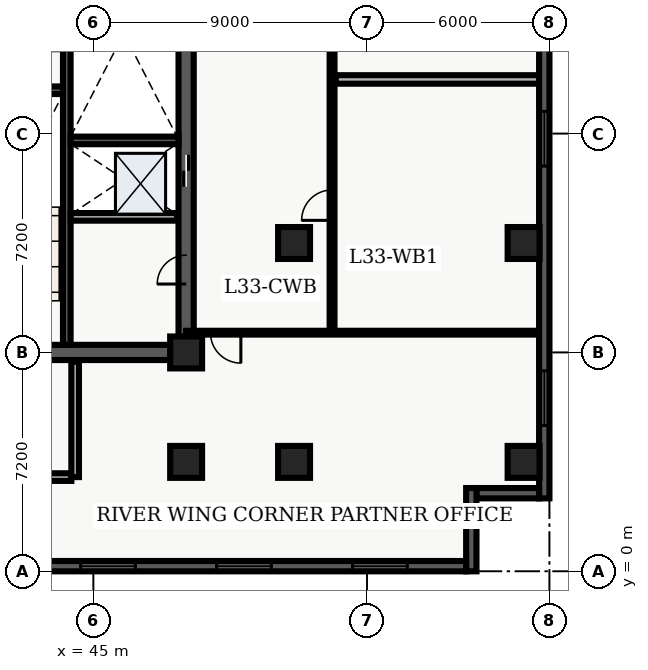
"""IFC4 building model, lengths in metres.
Left out: names, types, materials, properties, quantities, classifications, styles, units other than length and angle.
Written with IfcOpenShell. Run it as: python <this file> out.ifc"""

import sys

from ifc_helpers import new_model, entity, si_unit, converted_unit, direction, frame, origin_with_axes, origin_2d_with_axis, place, context, subcontext, project, spatial, polyline, rectangle, outline, extrude, element, fill, save


model = new_model("IFC4")
c1 = context("Model", 3, precision=1e-05, world=origin_with_axes(), true_north=direction((0.0, 1.0)))
c2 = subcontext(c1, "Body", "Model", "MODEL_VIEW")
j1 = project(units=[si_unit("LENGTHUNIT", "METRE"), converted_unit("PLANEANGLEUNIT", "DEGREE", entity("IfcPlaneAngleMeasure", 0.017), si_unit("PLANEANGLEUNIT", "RADIAN"), dimensions=[0, 0, 0, 0, 0, 0, 0])], contexts=[c1])
p1 = place(None, origin_with_axes())
s1 = spatial("IfcSite", under=j1, at=p1, CompositionType="ELEMENT")
p2 = place(p1, origin_with_axes())
s2 = spatial("IfcBuilding", under=s1, at=p2, CompositionType="ELEMENT")
p3 = place(p2, frame((0.0, 0.0, 136.8), z_axis=(0.0, 0.0, 1.0), x_axis=(1.0, 0.0, 0.0)))
s3 = spatial("IfcBuildingStorey", under=s2, at=p3, CompositionType="ELEMENT", Elevation=136.8)
p4 = place(p3, frame((40.2, 7.2, 0.0), z_axis=(0.0, 0.0, 1.0), x_axis=(1.0, 0.0, 0.0)))
e1 = element("IfcWall", 1, at=p4, inside=s3, PredefinedType="SHEAR", context=c2, shape_type="SweptSolid", body=[
    extrude(outline(polyline([(0.0, -0.25), (7.85, -0.25), (7.85, 0.25), (0.0, 0.25), (0.0, -0.25)])), origin_with_axes(), (0.0, 0.0, 1.0), 3.66),
])
p5 = place(p4, frame((2.175, 0.0, 0.0), z_axis=(0.0, 0.0, 1.0), x_axis=(1.0, 0.0, 0.0)))
e2 = element("IfcOpeningElement", 2, at=p5, cuts=e1, PredefinedType="OPENING", context=c2, shape_type="SweptSolid", body=[
    extrude(rectangle(XDim=1.05, YDim=0.52, at=origin_2d_with_axis()), origin_with_axes(), (0.0, 0.0, 1.0), 2.15),
])
p6 = place(p3, frame((48.05, 7.2, 0.0), z_axis=(0.0, 0.0, 1.0), x_axis=(0.0, 1.0, 0.0)))
e3 = element("IfcWall", 3, at=p6, inside=s3, PredefinedType="SHEAR", context=c2, shape_type="SweptSolid", body=[
    extrude(outline(polyline([(0.0, -0.25), (15.6, -0.25), (15.6, 0.25), (0.0, 0.25), (0.0, -0.25)])), origin_with_axes(), (0.0, 0.0, 1.0), 3.66),
])
p7 = place(p6, frame((5.975, 0.0, 0.0), z_axis=(0.0, 0.0, 1.0), x_axis=(1.0, 0.0, 0.0)))
e4 = element("IfcOpeningElement", 4, at=p7, cuts=e3, PredefinedType="OPENING", context=c2, shape_type="SweptSolid", body=[
    extrude(rectangle(XDim=1.05, YDim=0.52, at=origin_2d_with_axis()), origin_with_axes(), (0.0, 0.0, 1.0), 2.15),
])
p8 = place(p6, frame((2.725, 0.0, 0.0), z_axis=(0.0, 0.0, 1.0), x_axis=(1.0, 0.0, 0.0)))
e5 = element("IfcOpeningElement", 5, at=p8, cuts=e3, PredefinedType="OPENING", context=c2, shape_type="SweptSolid", body=[
    extrude(rectangle(XDim=0.95, YDim=0.52, at=origin_2d_with_axis()), origin_with_axes(), (0.0, 0.0, 1.0), 2.15),
])
p9 = place(p3, frame((44.125, 7.45, 0.0), z_axis=(0.0, 0.0, 1.0), x_axis=(0.0, 1.0, 0.0)))
e6 = element("IfcWall", 6, at=p9, inside=s3, PredefinedType="SHEAR", context=c2, shape_type="SweptSolid", body=[
    extrude(outline(polyline([(0.0, -0.125), (15.1, -0.125), (15.1, 0.125), (0.0, 0.125), (0.0, -0.125)])), origin_with_axes(), (0.0, 0.0, 1.0), 3.66),
])
for number, where, z_axis, x_axis in (
    (7, (40.45, 15.825, 0.0), (0.0, 0.0, 1.0), (1.0, 0.0, 0.0)),
    (8, (44.25, 14.175, 0.0), (0.0, 0.0, 1.0), (1.0, 0.0, 0.0)),
):
    element("IfcWall", number, at=place(p3, frame(where, z_axis=z_axis, x_axis=x_axis)), inside=s3, PredefinedType="SHEAR", context=c2, shape_type="SweptSolid", body=[
        extrude(outline(polyline([(0.0, -0.125), (3.55, -0.125), (3.55, 0.125), (0.0, 0.125), (0.0, -0.125)])), origin_with_axes(), (0.0, 0.0, 1.0), 3.66),
    ])
p10 = place(p3, frame((40.325, 3.1, 0.0), z_axis=(0.0, 0.0, 1.0), x_axis=(1.0, 0.0, 0.0)))
e9 = element("IfcWall", 9, at=p10, inside=s3, PredefinedType="SOLIDWALL", context=c2, shape_type="SweptSolid", body=[
    extrude(outline(polyline([(0.0, -0.125), (3.95, -0.125), (3.95, 0.125), (0.0, 0.125), (0.0, -0.125)])), origin_with_axes(), (0.0, 0.0, 1.0), 2.7),
])
p11 = place(p3, frame((44.4, 3.1, 0.0), z_axis=(0.0, 0.0, 1.0), x_axis=(0.0, 1.0, 0.0)))
e10 = element("IfcWall", 10, at=p11, inside=s3, PredefinedType="SOLIDWALL", context=c2, shape_type="SweptSolid", body=[
    extrude(outline(polyline([(0.0, -0.125), (3.8, -0.125), (3.8, 0.125), (0.0, 0.125), (0.0, -0.125)])), origin_with_axes(), (0.0, 0.0, 1.0), 2.7),
])
for number, where, z_axis, x_axis in (
    (11, (48.05, 3.6, 0.0), (0.0, 0.0, 1.0), (1.0, 0.0, 0.0)),
    (12, (48.05, 7.2, 0.0), (0.0, 0.0, 1.0), (1.0, 0.0, 0.0)),
    (13, (51.6, 3.6, 0.0), (0.0, 0.0, 1.0), (1.0, 0.0, 0.0)),
    (14, (51.6, 10.8, 0.0), (0.0, 0.0, 1.0), (1.0, 0.0, 0.0)),
    (15, (59.15, 3.6, 0.0), (0.0, 0.0, 1.0), (1.0, 0.0, 0.0)),
    (16, (59.15, 10.8, 0.0), (0.0, 0.0, 1.0), (1.0, 0.0, 0.0)),
):
    element("IfcColumn", number, at=place(p3, frame(where, z_axis=z_axis, x_axis=x_axis)), inside=s3, PredefinedType="COLUMN", context=c2, shape_type="SweptSolid", body=[
        extrude(rectangle(XDim=1.05, YDim=1.05, at=origin_2d_with_axis()), origin_with_axes(), (0.0, 0.0, 1.0), 3.9),
    ])
p12 = place(p3, frame((44.25, 11.66, 0.0), z_axis=(0.0, 0.0, 1.0), x_axis=(1.0, 0.0, 0.0)))
e17 = element("IfcWall", 17, at=p12, inside=s3, PredefinedType="SOLIDWALL", context=c2, shape_type="SweptSolid", body=[
    extrude(outline(polyline([(0.0, -0.125), (3.5, -0.125), (3.5, 0.125), (0.0, 0.125), (0.0, -0.125)])), origin_with_axes(), (0.0, 0.0, 1.0), 2.7),
])
p13 = place(p3, frame((52.85, 7.85, 0.0), z_axis=(0.0, 0.0, 1.0), x_axis=(0.0, 1.0, 0.0)))
e18 = element("IfcWall", 18, at=p13, inside=s3, PredefinedType="PARTITIONING", context=c2, shape_type="SweptSolid", body=[
    extrude(outline(polyline([(0.0, -0.08), (18.8, -0.08), (18.8, 0.08), (0.0, 0.08), (0.0, -0.08)])), origin_with_axes(), (0.0, 0.0, 1.0), 2.7),
])
p14 = place(p13, frame((4.195, 0.0, 0.0), z_axis=(0.0, 0.0, 1.0), x_axis=(1.0, 0.0, 0.0)))
e19 = element("IfcOpeningElement", 19, at=p14, cuts=e18, PredefinedType="OPENING", context=c2, shape_type="SweptSolid", body=[
    extrude(rectangle(XDim=1.0, YDim=0.18, at=origin_2d_with_axis()), origin_with_axes(), (0.0, 0.0, 1.0), 2.15),
])
p15 = place(p13, frame((13.535, 0.0, 0.0), z_axis=(0.0, 0.0, 1.0), x_axis=(1.0, 0.0, 0.0)))
e20 = element("IfcOpeningElement", 20, at=p15, cuts=e18, PredefinedType="OPENING", context=c2, shape_type="SweptSolid", body=[
    extrude(rectangle(XDim=1.0, YDim=0.18, at=origin_2d_with_axis()), origin_with_axes(), (0.0, 0.0, 1.0), 2.15),
])
p16 = place(p3, frame((59.665, 7.85, 0.0), z_axis=(0.0, 0.0, 1.0), x_axis=(-1.0, 0.0, 0.0)))
e21 = element("IfcWall", 21, at=p16, inside=s3, PredefinedType="PARTITIONING", context=c2, shape_type="SweptSolid", body=[
    extrude(outline(polyline([(0.0, -0.062), (11.615, -0.062), (11.615, 0.062), (0.0, 0.062), (0.0, -0.062)])), origin_with_axes(), (0.0, 0.0, 1.0), 2.7),
])
p17 = place(p16, frame((10.315, 0.0, 0.0), z_axis=(0.0, 0.0, 1.0), x_axis=(1.0, 0.0, 0.0)))
e22 = element("IfcOpeningElement", 22, at=p17, cuts=e21, PredefinedType="OPENING", context=c2, shape_type="SweptSolid", body=[
    extrude(rectangle(XDim=1.0, YDim=0.145, at=origin_2d_with_axis()), origin_with_axes(), (0.0, 0.0, 1.0), 2.15),
])
p18 = place(p3, frame((52.97, 16.18, 0.0), z_axis=(0.0, 0.0, 1.0), x_axis=(1.0, 0.0, 0.0)))
e23 = element("IfcWall", 23, at=p18, inside=s3, PredefinedType="PARTITIONING", context=c2, shape_type="SweptSolid", body=[
    extrude(outline(polyline([(0.0, -0.14), (6.695, -0.14), (6.695, 0.14), (0.0, 0.14), (0.0, -0.14)])), origin_with_axes(), (0.0, 0.0, 1.0), 2.7),
])
p19 = place(p3, frame((59.83, 26.06, 0.0), z_axis=(0.0, 0.0, 1.0), x_axis=(0.0, -1.0, 0.0)))
e24 = element("IfcWall", 24, at=p19, inside=s3, PredefinedType="SOLIDWALL", context=c2, shape_type="SweptSolid", body=[
    extrude(outline(polyline([(0.0, -0.17), (23.66, -0.17), (23.66, 0.17), (0.0, 0.17), (0.0, -0.17)])), origin_with_axes(), (0.0, 0.0, 1.0), 3.66),
])
p20 = place(p19, frame((3.696, 0.0, 0.45), z_axis=(0.0, 0.0, 1.0), x_axis=(1.0, 0.0, 0.0)))
e25 = element("IfcOpeningElement", 25, at=p20, cuts=e24, PredefinedType="OPENING", context=c2, shape_type="SweptSolid", body=[
    extrude(rectangle(XDim=1.8, YDim=0.36, at=origin_2d_with_axis()), origin_with_axes(), (0.0, 0.0, 1.0), 2.1),
])
p21 = place(p19, frame((11.83, 0.0, 0.45), z_axis=(0.0, 0.0, 1.0), x_axis=(1.0, 0.0, 0.0)))
e26 = element("IfcOpeningElement", 26, at=p21, cuts=e24, PredefinedType="OPENING", context=c2, shape_type="SweptSolid", body=[
    extrude(rectangle(XDim=1.8, YDim=0.36, at=origin_2d_with_axis()), origin_with_axes(), (0.0, 0.0, 1.0), 2.1),
])
p22 = place(p19, frame((20.364, 0.0, 0.45), z_axis=(0.0, 0.0, 1.0), x_axis=(1.0, 0.0, 0.0)))
e27 = element("IfcOpeningElement", 27, at=p22, cuts=e24, PredefinedType="OPENING", context=c2, shape_type="SweptSolid", body=[
    extrude(rectangle(XDim=1.8, YDim=0.36, at=origin_2d_with_axis()), origin_with_axes(), (0.0, 0.0, 1.0), 2.1),
])
p23 = place(p3, frame((59.66, 2.57, 0.0), z_axis=(0.0, 0.0, 1.0), x_axis=(-1.0, 0.0, 0.0)))
e28 = element("IfcWall", 28, at=p23, inside=s3, PredefinedType="SOLIDWALL", context=c2, shape_type="SweptSolid", body=[
    extrude(outline(polyline([(0.0, -0.17), (2.06, -0.17), (2.06, 0.17), (0.0, 0.17), (0.0, -0.17)])), origin_with_axes(), (0.0, 0.0, 1.0), 3.66),
])
p24 = place(p3, frame((57.43, 2.74, 0.0), z_axis=(0.0, 0.0, 1.0), x_axis=(0.0, -1.0, 0.0)))
e29 = element("IfcWall", 29, at=p24, inside=s3, PredefinedType="SOLIDWALL", context=c2, shape_type="SweptSolid", body=[
    extrude(outline(polyline([(0.0, -0.17), (2.74, -0.17), (2.74, 0.17), (0.0, 0.17), (0.0, -0.17)])), origin_with_axes(), (0.0, 0.0, 1.0), 3.66),
])
p25 = place(p3, frame((57.26, 0.17, 0.0), z_axis=(0.0, 0.0, 1.0), x_axis=(-1.0, 0.0, 0.0)))
e30 = element("IfcWall", 30, at=p25, inside=s3, PredefinedType="SOLIDWALL", context=c2, shape_type="SweptSolid", body=[
    extrude(outline(polyline([(0.0, -0.17), (54.86, -0.17), (54.86, 0.17), (0.0, 0.17), (0.0, -0.17)])), origin_with_axes(), (0.0, 0.0, 1.0), 3.66),
])
p26 = place(p25, frame((2.836, 0.0, 0.45), z_axis=(0.0, 0.0, 1.0), x_axis=(1.0, 0.0, 0.0)))
e31 = element("IfcOpeningElement", 31, at=p26, cuts=e30, PredefinedType="OPENING", context=c2, shape_type="SweptSolid", body=[
    extrude(rectangle(XDim=1.8, YDim=0.36, at=origin_2d_with_axis()), origin_with_axes(), (0.0, 0.0, 1.0), 2.1),
])
p27 = place(p25, frame((7.307, 0.0, 0.45), z_axis=(0.0, 0.0, 1.0), x_axis=(1.0, 0.0, 0.0)))
e32 = element("IfcOpeningElement", 32, at=p27, cuts=e30, PredefinedType="OPENING", context=c2, shape_type="SweptSolid", body=[
    extrude(rectangle(XDim=1.8, YDim=0.36, at=origin_2d_with_axis()), origin_with_axes(), (0.0, 0.0, 1.0), 2.1),
])
p28 = place(p25, frame((11.779, 0.0, 0.45), z_axis=(0.0, 0.0, 1.0), x_axis=(1.0, 0.0, 0.0)))
e33 = element("IfcOpeningElement", 33, at=p28, cuts=e30, PredefinedType="OPENING", context=c2, shape_type="SweptSolid", body=[
    extrude(rectangle(XDim=1.8, YDim=0.36, at=origin_2d_with_axis()), origin_with_axes(), (0.0, 0.0, 1.0), 2.1),
])
p29 = place(p25, frame((16.251, 0.0, 0.45), z_axis=(0.0, 0.0, 1.0), x_axis=(1.0, 0.0, 0.0)))
e34 = element("IfcOpeningElement", 34, at=p29, cuts=e30, PredefinedType="OPENING", context=c2, shape_type="SweptSolid", body=[
    extrude(rectangle(XDim=1.8, YDim=0.36, at=origin_2d_with_axis()), origin_with_axes(), (0.0, 0.0, 1.0), 2.1),
])
p30 = place(p25, frame((20.723, 0.0, 0.45), z_axis=(0.0, 0.0, 1.0), x_axis=(1.0, 0.0, 0.0)))
e35 = element("IfcOpeningElement", 35, at=p30, cuts=e30, PredefinedType="OPENING", context=c2, shape_type="SweptSolid", body=[
    extrude(rectangle(XDim=1.8, YDim=0.36, at=origin_2d_with_axis()), origin_with_axes(), (0.0, 0.0, 1.0), 2.1),
])
p31 = place(p25, frame((34.138, 0.0, 0.45), z_axis=(0.0, 0.0, 1.0), x_axis=(1.0, 0.0, 0.0)))
e36 = element("IfcOpeningElement", 36, at=p31, cuts=e30, PredefinedType="OPENING", context=c2, shape_type="SweptSolid", body=[
    extrude(rectangle(XDim=1.8, YDim=0.36, at=origin_2d_with_axis()), origin_with_axes(), (0.0, 0.0, 1.0), 2.1),
])
p32 = place(p25, frame((38.609, 0.0, 0.45), z_axis=(0.0, 0.0, 1.0), x_axis=(1.0, 0.0, 0.0)))
e37 = element("IfcOpeningElement", 37, at=p32, cuts=e30, PredefinedType="OPENING", context=c2, shape_type="SweptSolid", body=[
    extrude(rectangle(XDim=1.8, YDim=0.36, at=origin_2d_with_axis()), origin_with_axes(), (0.0, 0.0, 1.0), 2.1),
])
p33 = place(p25, frame((43.081, 0.0, 0.45), z_axis=(0.0, 0.0, 1.0), x_axis=(1.0, 0.0, 0.0)))
e38 = element("IfcOpeningElement", 38, at=p33, cuts=e30, PredefinedType="OPENING", context=c2, shape_type="SweptSolid", body=[
    extrude(rectangle(XDim=1.8, YDim=0.36, at=origin_2d_with_axis()), origin_with_axes(), (0.0, 0.0, 1.0), 2.1),
])
p34 = place(p25, frame((47.553, 0.0, 0.45), z_axis=(0.0, 0.0, 1.0), x_axis=(1.0, 0.0, 0.0)))
e39 = element("IfcOpeningElement", 39, at=p34, cuts=e30, PredefinedType="OPENING", context=c2, shape_type="SweptSolid", body=[
    extrude(rectangle(XDim=1.8, YDim=0.36, at=origin_2d_with_axis()), origin_with_axes(), (0.0, 0.0, 1.0), 2.1),
])
p35 = place(p25, frame((52.024, 0.0, 0.45), z_axis=(0.0, 0.0, 1.0), x_axis=(1.0, 0.0, 0.0)))
e40 = element("IfcOpeningElement", 40, at=p35, cuts=e30, PredefinedType="OPENING", context=c2, shape_type="SweptSolid", body=[
    extrude(rectangle(XDim=1.8, YDim=0.36, at=origin_2d_with_axis()), origin_with_axes(), (0.0, 0.0, 1.0), 2.1),
])
p36 = place(p6, frame((5.975, 0.0, 0.0), z_axis=(0.0, 0.0, 1.0), x_axis=(1.0, 0.0, 0.0)))
e41 = element("IfcDoor", 41, at=p36, inside=s3, OperationType="SLIDING_TO_LEFT", PredefinedType="DOOR", context=c2, shape_type="SweptSolid", body=[
    extrude(rectangle(XDim=1.05, YDim=0.09, at=origin_2d_with_axis()), origin_with_axes(), (0.0, 0.0, 1.0), 2.15),
])
fill(e4, e41)
p37 = place(p6, frame((2.725, 0.0, 0.0), z_axis=(0.0, 0.0, 1.0), x_axis=(1.0, 0.0, 0.0)))
e42 = element("IfcDoor", 42, at=p37, inside=s3, OperationType="SINGLE_SWING_LEFT", PredefinedType="DOOR", context=c2, shape_type="SweptSolid", body=[
    extrude(rectangle(XDim=0.95, YDim=0.09, at=origin_2d_with_axis()), origin_with_axes(), (0.0, 0.0, 1.0), 2.15),
])
fill(e5, e42)
p38 = place(p16, frame((10.315, 0.0, 0.0), z_axis=(0.0, 0.0, 1.0), x_axis=(1.0, 0.0, 0.0)))
e43 = element("IfcDoor", 43, at=p38, inside=s3, OperationType="SINGLE_SWING_LEFT", PredefinedType="DOOR", context=c2, shape_type="SweptSolid", body=[
    extrude(rectangle(XDim=1.0, YDim=0.075, at=origin_2d_with_axis()), origin_with_axes(), (0.0, 0.0, 1.0), 2.15),
])
fill(e22, e43)
p39 = place(p13, frame((4.195, 0.0, 0.0), z_axis=(0.0, 0.0, 1.0), x_axis=(1.0, 0.0, 0.0)))
e44 = element("IfcDoor", 44, at=p39, inside=s3, OperationType="SINGLE_SWING_LEFT", PredefinedType="DOOR", context=c2, shape_type="SweptSolid", body=[
    extrude(rectangle(XDim=1.0, YDim=0.09, at=origin_2d_with_axis()), origin_with_axes(), (0.0, 0.0, 1.0), 2.15),
])
fill(e19, e44)
p40 = place(p19, frame((11.83, 0.0, 0.45), z_axis=(0.0, 0.0, 1.0), x_axis=(1.0, 0.0, 0.0)))
e45 = element("IfcWindow", 45, at=p40, inside=s3, PredefinedType="WINDOW", context=c2, shape_type="SweptSolid", body=[
    extrude(rectangle(XDim=1.8, YDim=0.09, at=origin_2d_with_axis()), origin_with_axes(), (0.0, 0.0, 1.0), 2.1),
])
fill(e26, e45)
p41 = place(p19, frame((20.364, 0.0, 0.45), z_axis=(0.0, 0.0, 1.0), x_axis=(1.0, 0.0, 0.0)))
e46 = element("IfcWindow", 46, at=p41, inside=s3, PredefinedType="WINDOW", context=c2, shape_type="SweptSolid", body=[
    extrude(rectangle(XDim=1.8, YDim=0.09, at=origin_2d_with_axis()), origin_with_axes(), (0.0, 0.0, 1.0), 2.1),
])
fill(e27, e46)
p42 = place(p25, frame((2.836, 0.0, 0.45), z_axis=(0.0, 0.0, 1.0), x_axis=(1.0, 0.0, 0.0)))
e47 = element("IfcWindow", 47, at=p42, inside=s3, PredefinedType="WINDOW", context=c2, shape_type="SweptSolid", body=[
    extrude(rectangle(XDim=1.8, YDim=0.09, at=origin_2d_with_axis()), origin_with_axes(), (0.0, 0.0, 1.0), 2.1),
])
fill(e31, e47)
p43 = place(p25, frame((7.307, 0.0, 0.45), z_axis=(0.0, 0.0, 1.0), x_axis=(1.0, 0.0, 0.0)))
e48 = element("IfcWindow", 48, at=p43, inside=s3, PredefinedType="WINDOW", context=c2, shape_type="SweptSolid", body=[
    extrude(rectangle(XDim=1.8, YDim=0.09, at=origin_2d_with_axis()), origin_with_axes(), (0.0, 0.0, 1.0), 2.1),
])
fill(e32, e48)
p44 = place(p25, frame((11.779, 0.0, 0.45), z_axis=(0.0, 0.0, 1.0), x_axis=(1.0, 0.0, 0.0)))
e49 = element("IfcWindow", 49, at=p44, inside=s3, PredefinedType="WINDOW", context=c2, shape_type="SweptSolid", body=[
    extrude(rectangle(XDim=1.8, YDim=0.09, at=origin_2d_with_axis()), origin_with_axes(), (0.0, 0.0, 1.0), 2.1),
])
fill(e33, e49)
save(model, sys.argv[1])
